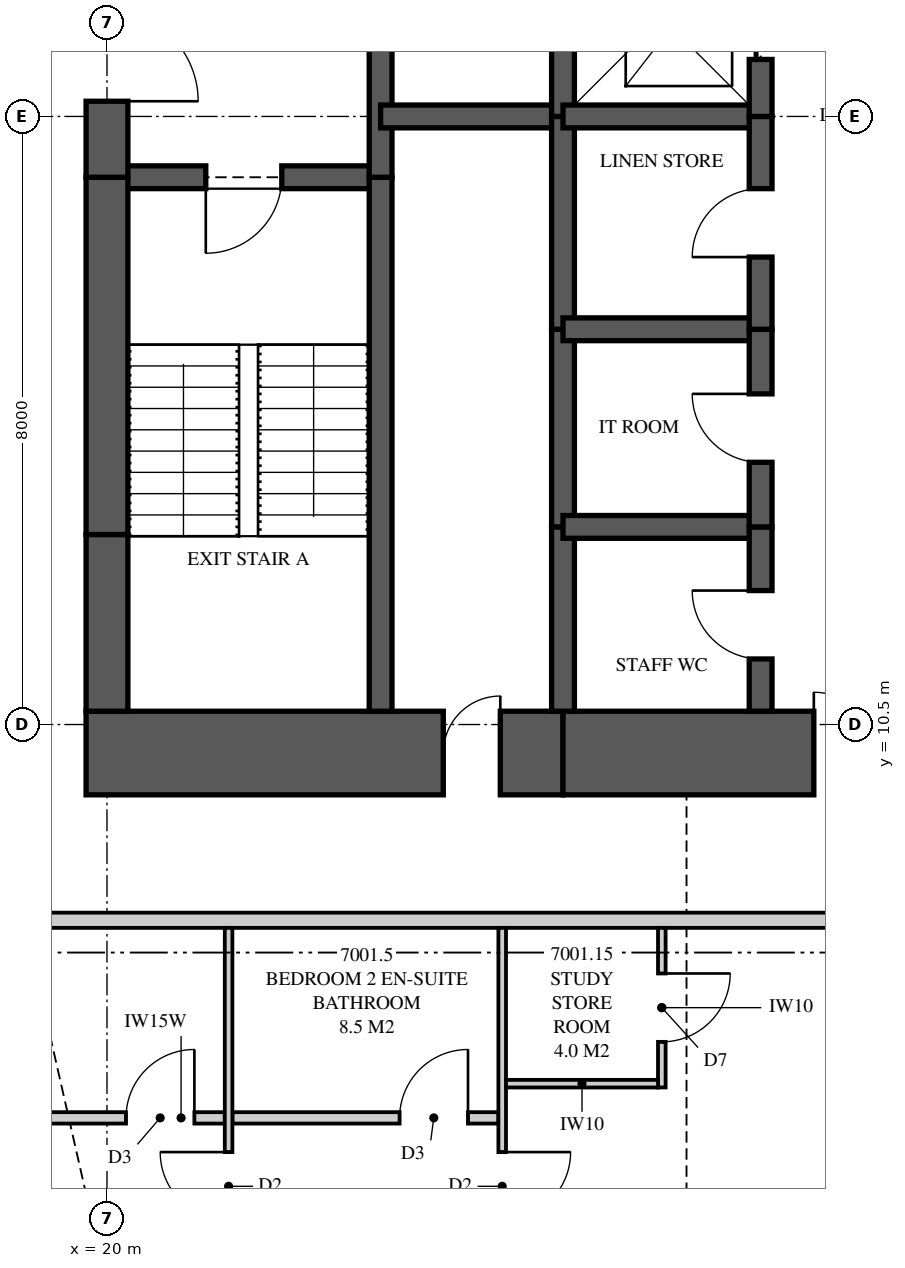
"""IFC4 building model, lengths in metres.
Left out: names, types, materials, properties, quantities, classifications, styles, units other than length and angle.
Written with IfcOpenShell. Run it as: python <this file> out.ifc"""

import sys

from ifc_helpers import new_model, si_unit, direction, frame, frame_2d, origin, place, context, subcontext, project, spatial, polyline, rectangle, outline, extrude, element, fill, save


model = new_model("IFC4")
c1 = context("Model", 3, precision=1e-05, world=origin(), true_north=direction((0.0, 1.0)))
c2 = subcontext(c1, "Body", "Model", "MODEL_VIEW")
j1 = project(units=[si_unit("LENGTHUNIT", "METRE"), si_unit("PLANEANGLEUNIT", "RADIAN")], contexts=[c1])
p1 = place(None, origin())
s1 = spatial("IfcSite", under=j1, at=p1, CompositionType="ELEMENT")
p2 = place(p1, origin())
s2 = spatial("IfcBuilding", under=s1, at=p2, CompositionType="ELEMENT")
p3 = place(p2, frame((0.0, 0.0, 256.45)))
s3 = spatial("IfcBuildingStorey", under=s2, at=p3, CompositionType="ELEMENT", Elevation=256.45)
p4 = place(p3, frame((19.725, 10.125, 0.0), z_axis=(0.0, 0.0, 1.0), x_axis=(1.0, 0.0, 0.0)))
e1 = element("IfcWall", 1, at=p4, inside=s3, PredefinedType="SHEAR", context=c2, shape_type="SweptSolid", body=[
    extrude(rectangle(XDim=6.275, YDim=1.1, at=frame_2d((3.137, 0.0))), origin(), (0.0, 0.0, 1.0), 3.5),
])
p5 = place(p4, frame((4.7, 0.0, 0.0)))
e2 = element("IfcOpeningElement", 2, at=p5, cuts=e1, PredefinedType="OPENING", context=c2, shape_type="SweptSolid", body=[
    extrude(rectangle(XDim=0.75, YDim=2.1, at=frame_2d((0.375, 1.05))), frame((0.0, 0.56, 0.0), z_axis=(0.0, -1.0, 0.0), x_axis=(1.0, 0.0, 0.0)), (0.0, 0.0, 1.0), 1.12),
])
p6 = place(p3, frame((26.0, 10.125, 0.0), z_axis=(0.0, 0.0, 1.0), x_axis=(1.0, 0.0, 0.0)))
e3 = element("IfcWall", 3, at=p6, inside=s3, PredefinedType="SHEAR", context=c2, shape_type="SweptSolid", body=[
    extrude(rectangle(XDim=5.6, YDim=1.1, at=frame_2d((2.8, 0.0))), origin(), (0.0, 0.0, 1.0), 3.5),
])
p7 = place(p6, frame((3.3, 0.0, 0.0)))
e4 = element("IfcOpeningElement", 4, at=p7, cuts=e3, PredefinedType="OPENING", context=c2, shape_type="SweptSolid", body=[
    extrude(rectangle(XDim=1.6, YDim=2.1, at=frame_2d((0.8, 1.05))), frame((0.0, 0.56, 0.0), z_axis=(0.0, -1.0, 0.0), x_axis=(1.0, 0.0, 0.0)), (0.0, 0.0, 1.0), 1.12),
])
p8 = place(p3, frame((20.0, 23.3, 0.0), z_axis=(0.0, 0.0, 1.0), x_axis=(0.0, -1.0, 0.0)))
e5 = element("IfcWall", 5, at=p8, inside=s3, PredefinedType="SHEAR", context=c2, shape_type="SweptSolid", body=[
    extrude(rectangle(XDim=5.6, YDim=0.55, at=frame_2d((2.8, 0.0))), origin(), (0.0, 0.0, 1.0), 3.5),
])
p9 = place(p8, frame((3.4, 0.0, 0.0)))
e6 = element("IfcOpeningElement", 6, at=p9, cuts=e5, PredefinedType="OPENING", context=c2, shape_type="SweptSolid", body=[
    extrude(rectangle(XDim=1.2, YDim=2.2, at=frame_2d((0.6, 1.1))), frame((0.0, 0.285, 0.0), z_axis=(0.0, -1.0, 0.0), x_axis=(1.0, 0.0, 0.0)), (0.0, 0.0, 1.0), 0.57),
])
p10 = place(p3, frame((20.0, 17.7, 0.0), z_axis=(0.0, 0.0, 1.0), x_axis=(0.0, -1.0, 0.0)))
e7 = element("IfcWall", 7, at=p10, inside=s3, PredefinedType="SHEAR", context=c2, shape_type="SweptSolid", body=[
    extrude(rectangle(XDim=4.7, YDim=0.55, at=frame_2d((2.35, 0.0))), origin(), (0.0, 0.0, 1.0), 3.5),
])
p11 = place(p3, frame((20.0, 13.0, 0.0), z_axis=(0.0, 0.0, 1.0), x_axis=(0.0, -1.0, 0.0)))
e8 = element("IfcWall", 8, at=p11, inside=s3, PredefinedType="SHEAR", context=c2, shape_type="SweptSolid", body=[
    extrude(rectangle(XDim=2.325, YDim=0.55, at=frame_2d((1.163, 0.0))), origin(), (0.0, 0.0, 1.0), 3.5),
])
p12 = place(p3, frame((23.6, 10.675, 0.0), z_axis=(0.0, 0.0, 1.0), x_axis=(0.0, 1.0, 0.0)))
e9 = element("IfcWall", 9, at=p12, inside=s3, PredefinedType="SHEAR", context=c2, shape_type="SweptSolid", body=[
    extrude(rectangle(XDim=7.025, YDim=0.3, at=frame_2d((3.512, 0.0))), origin(), (0.0, 0.0, 1.0), 3.5),
])
p13 = place(p3, frame((23.6, 17.7, 0.0), z_axis=(0.0, 0.0, 1.0), x_axis=(0.0, 1.0, 0.0)))
e10 = element("IfcWall", 10, at=p13, inside=s3, PredefinedType="SHEAR", context=c2, shape_type="SweptSolid", body=[
    extrude(rectangle(XDim=5.6, YDim=0.3, at=frame_2d((2.8, 0.0))), origin(), (0.0, 0.0, 1.0), 3.5),
])
p14 = place(p3, frame((26.0, 10.675, 0.0), z_axis=(0.0, 0.0, 1.0), x_axis=(0.0, 1.0, 0.0)))
e11 = element("IfcWall", 11, at=p14, inside=s3, PredefinedType="SHEAR", context=c2, shape_type="SweptSolid", body=[
    extrude(rectangle(XDim=2.425, YDim=0.3, at=frame_2d((1.212, 0.0))), origin(), (0.0, 0.0, 1.0), 3.5),
])
p15 = place(p3, frame((26.0, 13.1, 0.0), z_axis=(0.0, 0.0, 1.0), x_axis=(0.0, 1.0, 0.0)))
e12 = element("IfcWall", 12, at=p15, inside=s3, PredefinedType="SHEAR", context=c2, shape_type="SweptSolid", body=[
    extrude(rectangle(XDim=2.6, YDim=0.3, at=frame_2d((1.3, 0.0))), origin(), (0.0, 0.0, 1.0), 3.5),
])
p16 = place(p3, frame((26.0, 15.7, 0.0), z_axis=(0.0, 0.0, 1.0), x_axis=(0.0, 1.0, 0.0)))
e13 = element("IfcWall", 13, at=p16, inside=s3, PredefinedType="SHEAR", context=c2, shape_type="SweptSolid", body=[
    extrude(rectangle(XDim=2.8, YDim=0.3, at=frame_2d((1.4, 0.0))), origin(), (0.0, 0.0, 1.0), 3.5),
])
p17 = place(p3, frame((26.0, 18.5, 0.0), z_axis=(0.0, 0.0, 1.0), x_axis=(0.0, 1.0, 0.0)))
e14 = element("IfcWall", 14, at=p17, inside=s3, PredefinedType="SHEAR", context=c2, shape_type="SweptSolid", body=[
    extrude(rectangle(XDim=2.6, YDim=0.3, at=frame_2d((1.3, 0.0))), origin(), (0.0, 0.0, 1.0), 3.5),
])
p18 = place(p3, frame((28.6, 10.675, 0.0), z_axis=(0.0, 0.0, 1.0), x_axis=(0.0, 1.0, 0.0)))
e15 = element("IfcWall", 15, at=p18, inside=s3, PredefinedType="SHEAR", context=c2, shape_type="SweptSolid", body=[
    extrude(rectangle(XDim=2.425, YDim=0.3, at=frame_2d((1.212, 0.0))), origin(), (0.0, 0.0, 1.0), 3.5),
])
p19 = place(p18, frame((0.688, 0.0, 0.0)))
e16 = element("IfcOpeningElement", 16, at=p19, cuts=e15, PredefinedType="OPENING", context=c2, shape_type="SweptSolid", body=[
    extrude(rectangle(XDim=0.9, YDim=2.1, at=frame_2d((0.45, 1.05))), frame((0.0, 0.16, 0.0), z_axis=(0.0, -1.0, 0.0), x_axis=(1.0, 0.0, 0.0)), (0.0, 0.0, 1.0), 0.32),
])
p20 = place(p3, frame((28.6, 13.1, 0.0), z_axis=(0.0, 0.0, 1.0), x_axis=(0.0, 1.0, 0.0)))
e17 = element("IfcWall", 17, at=p20, inside=s3, PredefinedType="SHEAR", context=c2, shape_type="SweptSolid", body=[
    extrude(rectangle(XDim=2.6, YDim=0.3, at=frame_2d((1.3, 0.0))), origin(), (0.0, 0.0, 1.0), 3.5),
])
p21 = place(p20, frame((0.85, 0.0, 0.0)))
e18 = element("IfcOpeningElement", 18, at=p21, cuts=e17, PredefinedType="OPENING", context=c2, shape_type="SweptSolid", body=[
    extrude(rectangle(XDim=0.9, YDim=2.1, at=frame_2d((0.45, 1.05))), frame((0.0, 0.16, 0.0), z_axis=(0.0, -1.0, 0.0), x_axis=(1.0, 0.0, 0.0)), (0.0, 0.0, 1.0), 0.32),
])
p22 = place(p3, frame((28.6, 15.7, 0.0), z_axis=(0.0, 0.0, 1.0), x_axis=(0.0, 1.0, 0.0)))
e19 = element("IfcWall", 19, at=p22, inside=s3, PredefinedType="SHEAR", context=c2, shape_type="SweptSolid", body=[
    extrude(rectangle(XDim=2.8, YDim=0.3, at=frame_2d((1.4, 0.0))), origin(), (0.0, 0.0, 1.0), 3.5),
])
p23 = place(p22, frame((0.95, 0.0, 0.0)))
e20 = element("IfcOpeningElement", 20, at=p23, cuts=e19, PredefinedType="OPENING", context=c2, shape_type="SweptSolid", body=[
    extrude(rectangle(XDim=0.9, YDim=2.1, at=frame_2d((0.45, 1.05))), frame((0.0, 0.16, 0.0), z_axis=(0.0, -1.0, 0.0), x_axis=(1.0, 0.0, 0.0)), (0.0, 0.0, 1.0), 0.32),
])
p24 = place(p3, frame((28.6, 18.5, 0.0), z_axis=(0.0, 0.0, 1.0), x_axis=(0.0, 1.0, 0.0)))
e21 = element("IfcWall", 21, at=p24, inside=s3, PredefinedType="SHEAR", context=c2, shape_type="SweptSolid", body=[
    extrude(rectangle(XDim=2.6, YDim=0.3, at=frame_2d((1.3, 0.0))), origin(), (0.0, 0.0, 1.0), 3.5),
])
p25 = place(p24, frame((0.75, 0.0, 0.0)))
e22 = element("IfcOpeningElement", 22, at=p25, cuts=e21, PredefinedType="OPENING", context=c2, shape_type="SweptSolid", body=[
    extrude(rectangle(XDim=1.1, YDim=2.1, at=frame_2d((0.55, 1.05))), frame((0.0, 0.16, 0.0), z_axis=(0.0, -1.0, 0.0), x_axis=(1.0, 0.0, 0.0)), (0.0, 0.0, 1.0), 0.32),
])
p26 = place(p3, frame((20.0, 17.7, 0.0), z_axis=(0.0, 0.0, 1.0), x_axis=(1.0, 0.0, 0.0)))
e23 = element("IfcWall", 23, at=p26, inside=s3, PredefinedType="SHEAR", context=c2, shape_type="SweptSolid", body=[
    extrude(rectangle(XDim=3.6, YDim=0.3, at=frame_2d((1.8, 0.0))), origin(), (0.0, 0.0, 1.0), 3.5),
])
p27 = place(p26, frame((1.3, 0.0, 0.0)))
e24 = element("IfcOpeningElement", 24, at=p27, cuts=e23, PredefinedType="OPENING", context=c2, shape_type="SweptSolid", body=[
    extrude(rectangle(XDim=1.0, YDim=2.1, at=frame_2d((0.5, 1.05))), frame((0.0, 0.16, 0.0), z_axis=(0.0, -1.0, 0.0), x_axis=(1.0, 0.0, 0.0)), (0.0, 0.0, 1.0), 0.32),
])
p28 = place(p3, frame((23.6, 18.5, 0.0), z_axis=(0.0, 0.0, 1.0), x_axis=(1.0, 0.0, 0.0)))
e25 = element("IfcWall", 25, at=p28, inside=s3, PredefinedType="SHEAR", context=c2, shape_type="SweptSolid", body=[
    extrude(rectangle(XDim=2.4, YDim=0.3, at=frame_2d((1.2, 0.0))), origin(), (0.0, 0.0, 1.0), 3.5),
])
for number, where, z_axis, x_axis in (
    (26, (26.0, 13.1, 0.0), (0.0, 0.0, 1.0), (1.0, 0.0, 0.0)),
    (27, (26.0, 15.7, 0.0), (0.0, 0.0, 1.0), (1.0, 0.0, 0.0)),
    (28, (26.0, 18.5, 0.0), (0.0, 0.0, 1.0), (1.0, 0.0, 0.0)),
):
    element("IfcWall", number, at=place(p3, frame(where, z_axis=z_axis, x_axis=x_axis)), inside=s3, PredefinedType="SHEAR", context=c2, shape_type="SweptSolid", body=[
        extrude(rectangle(XDim=2.6, YDim=0.3, at=frame_2d((1.3, 0.0))), origin(), (0.0, 0.0, 1.0), 3.5),
    ])
p29 = place(p3, frame((18.0, 7.925, 0.0), z_axis=(0.0, 0.0, 1.0), x_axis=(1.0, 0.0, 0.0)))
e29 = element("IfcWall", 29, at=p29, inside=s3, PredefinedType="PARTITIONING", context=c2, shape_type="SweptSolid", body=[
    extrude(outline(polyline([(0.0, 0.0), (38.325, 0.0), (38.325, 3.26), (37.875, 3.26), (37.875, 2.3), (36.043, 2.3), (36.043, 3.26), (30.185, 3.26), (30.185, 2.66), (27.565, 2.66), (27.565, 3.26), (20.56, 3.26), (20.56, 2.66), (17.94, 2.66), (17.94, 3.26), (10.935, 3.26), (10.935, 2.66), (8.315, 2.66), (8.315, 3.26), (1.839, 3.26), (1.839, 2.3), (0.0, 2.3), (0.0, 3.26), (0.0, 0.0)])), frame((0.0, 0.1, 0.0), z_axis=(0.0, -1.0, 0.0), x_axis=(1.0, 0.0, 0.0)), (0.0, 0.0, 1.0), 0.2),
])
p30 = place(p29, frame((18.75, 0.0, 0.0)))
e30 = element("IfcOpeningElement", 30, at=p30, cuts=e29, PredefinedType="OPENING", context=c2, shape_type="SweptSolid", body=[
    extrude(rectangle(XDim=1.05, YDim=2.2, at=frame_2d((0.525, 1.1))), frame((0.0, 0.11, 0.0), z_axis=(0.0, -1.0, 0.0), x_axis=(1.0, 0.0, 0.0)), (0.0, 0.0, 1.0), 0.22),
])
p31 = place(p3, frame((21.6, 0.175, 0.0), z_axis=(0.0, 0.0, 1.0), x_axis=(0.0, 1.0, 0.0)))
e31 = element("IfcWall", 31, at=p31, inside=s3, PredefinedType="PARTITIONING", context=c2, shape_type="SweptSolid", body=[
    extrude(outline(polyline([(0.0, 0.0), (7.65, 0.0), (7.65, 3.26), (2.668, 3.26), (2.668, 2.3), (0.924, 2.3), (0.924, 3.26), (0.0, 3.26), (0.0, 0.0)])), frame((0.0, 0.05, 0.0), z_axis=(0.0, -1.0, 0.0), x_axis=(1.0, 0.0, 0.0)), (0.0, 0.0, 1.0), 0.1),
])
p32 = place(p31, frame((3.8, 0.0, 0.0)))
e32 = element("IfcOpeningElement", 32, at=p32, cuts=e31, PredefinedType="OPENING", context=c2, shape_type="SweptSolid", body=[
    extrude(rectangle(XDim=0.9, YDim=2.1, at=frame_2d((0.45, 1.05))), frame((0.0, 0.06, 0.0), z_axis=(0.0, -1.0, 0.0), x_axis=(1.0, 0.0, 0.0)), (0.0, 0.0, 1.0), 0.12),
])
p33 = place(p3, frame((25.2, 0.175, 0.0), z_axis=(0.0, 0.0, 1.0), x_axis=(0.0, 1.0, 0.0)))
e33 = element("IfcWall", 33, at=p33, inside=s3, PredefinedType="PARTITIONING", context=c2, shape_type="SweptSolid", body=[
    extrude(outline(polyline([(0.0, 0.0), (7.65, 0.0), (7.65, 3.26), (2.058, 3.26), (2.058, 2.3), (0.314, 2.3), (0.314, 3.26), (0.0, 3.26), (0.0, 0.0)])), frame((0.0, 0.05, 0.0), z_axis=(0.0, -1.0, 0.0), x_axis=(1.0, 0.0, 0.0)), (0.0, 0.0, 1.0), 0.1),
])
p34 = place(p33, frame((3.8, 0.0, 0.0)))
e34 = element("IfcOpeningElement", 34, at=p34, cuts=e33, PredefinedType="OPENING", context=c2, shape_type="SweptSolid", body=[
    extrude(rectangle(XDim=0.9, YDim=2.1, at=frame_2d((0.45, 1.05))), frame((0.0, 0.06, 0.0), z_axis=(0.0, -1.0, 0.0), x_axis=(1.0, 0.0, 0.0)), (0.0, 0.0, 1.0), 0.12),
])
p35 = place(p3, frame((16.8, 5.325, 0.0), z_axis=(0.0, 0.0, 1.0), x_axis=(1.0, 0.0, 0.0)))
e35 = element("IfcWall", 35, at=p35, inside=s3, PredefinedType="PLUMBINGWALL", context=c2, shape_type="SweptSolid", body=[
    extrude(outline(polyline([(0.0, 0.0), (4.75, 0.0), (4.75, 3.26), (3.605, 3.26), (3.605, 2.3), (1.79, 2.3), (1.79, 3.26), (0.0, 3.26), (0.0, 0.0)])), frame((0.0, 0.075, 0.0), z_axis=(0.0, -1.0, 0.0), x_axis=(1.0, 0.0, 0.0)), (0.0, 0.0, 1.0), 0.15),
])
p36 = place(p35, frame((3.45, 0.0, 0.0)))
e36 = element("IfcOpeningElement", 36, at=p36, cuts=e35, PredefinedType="OPENING", context=c2, shape_type="SweptSolid", body=[
    extrude(rectangle(XDim=0.9, YDim=2.1, at=frame_2d((0.45, 1.05))), frame((0.0, 0.085, 0.0), z_axis=(0.0, -1.0, 0.0), x_axis=(1.0, 0.0, 0.0)), (0.0, 0.0, 1.0), 0.17),
])
p37 = place(p3, frame((21.65, 5.325, 0.0), z_axis=(0.0, 0.0, 1.0), x_axis=(1.0, 0.0, 0.0)))
e37 = element("IfcWall", 37, at=p37, inside=s3, PredefinedType="PLUMBINGWALL", context=c2, shape_type="SweptSolid", body=[
    extrude(rectangle(XDim=3.5, YDim=0.15, at=frame_2d((1.75, 0.0))), origin(), (0.0, 0.0, 1.0), 3.26),
])
p38 = place(p37, frame((2.2, 0.0, 0.0)))
e38 = element("IfcOpeningElement", 38, at=p38, cuts=e37, PredefinedType="OPENING", context=c2, shape_type="SweptSolid", body=[
    extrude(rectangle(XDim=0.9, YDim=2.1, at=frame_2d((0.45, 1.05))), frame((0.0, 0.085, 0.0), z_axis=(0.0, -1.0, 0.0), x_axis=(1.0, 0.0, 0.0)), (0.0, 0.0, 1.0), 0.17),
])
p39 = place(p3, frame((27.3, 7.825, 0.0), z_axis=(0.0, 0.0, 1.0), x_axis=(0.0, -1.0, 0.0)))
e39 = element("IfcWall", 39, at=p39, inside=s3, PredefinedType="PARTITIONING", context=c2, shape_type="SweptSolid", body=[
    extrude(outline(polyline([(0.0, 0.0), (2.1, 0.0), (2.1, 3.26), (2.1, 2.66), (0.0, 2.66), (0.0, 3.26), (0.0, 0.0)])), frame((0.0, 0.05, 0.0), z_axis=(0.0, -1.0, 0.0), x_axis=(1.0, 0.0, 0.0)), (0.0, 0.0, 1.0), 0.1),
])
p40 = place(p39, frame((0.6, 0.0, 0.0)))
e40 = element("IfcOpeningElement", 40, at=p40, cuts=e39, PredefinedType="OPENING", context=c2, shape_type="SweptSolid", body=[
    extrude(rectangle(XDim=0.9, YDim=2.1, at=frame_2d((0.45, 1.05))), frame((0.0, 0.06, 0.0), z_axis=(0.0, -1.0, 0.0), x_axis=(1.0, 0.0, 0.0)), (0.0, 0.0, 1.0), 0.12),
])
p41 = place(p3, frame((25.25, 5.775, 0.0), z_axis=(0.0, 0.0, 1.0), x_axis=(1.0, 0.0, 0.0)))
e41 = element("IfcWall", 41, at=p41, inside=s3, PredefinedType="PARTITIONING", context=c2, shape_type="SweptSolid", body=[
    extrude(outline(polyline([(0.0, 0.0), (2.0, 0.0), (2.0, 3.26), (2.0, 2.66), (1.115, 2.66), (1.115, 3.26), (0.0, 3.26), (0.0, 0.0)])), frame((0.0, 0.05, 0.0), z_axis=(0.0, -1.0, 0.0), x_axis=(1.0, 0.0, 0.0)), (0.0, 0.0, 1.0), 0.1),
])
p42 = place(p32, origin())
e42 = element("IfcDoor", 42, at=p42, inside=s3, OperationType="SINGLE_SWING_RIGHT", PredefinedType="DOOR", context=c2, shape_type="SweptSolid", body=[
    extrude(rectangle(XDim=0.9, YDim=2.1, at=frame_2d((0.45, 1.05))), frame((0.0, 0.025, 0.0), z_axis=(0.0, -1.0, 0.0), x_axis=(1.0, 0.0, 0.0)), (0.0, 0.0, 1.0), 0.05),
])
fill(e32, e42)
p43 = place(p36, origin())
e43 = element("IfcDoor", 43, at=p43, inside=s3, OperationType="SINGLE_SWING_RIGHT", PredefinedType="DOOR", context=c2, shape_type="SweptSolid", body=[
    extrude(rectangle(XDim=0.9, YDim=2.1, at=frame_2d((0.45, 1.05))), frame((0.0, 0.025, 0.0), z_axis=(0.0, -1.0, 0.0), x_axis=(1.0, 0.0, 0.0)), (0.0, 0.0, 1.0), 0.05),
])
fill(e36, e43)
p44 = place(p34, frame((0.9, 0.0, 0.0), z_axis=(0.0, 0.0, 1.0), x_axis=(-1.0, 0.0, 0.0)))
e44 = element("IfcDoor", 44, at=p44, inside=s3, OperationType="SINGLE_SWING_LEFT", PredefinedType="DOOR", context=c2, shape_type="SweptSolid", body=[
    extrude(rectangle(XDim=0.9, YDim=2.1, at=frame_2d((0.45, 1.05))), frame((0.0, 0.025, 0.0), z_axis=(0.0, -1.0, 0.0), x_axis=(1.0, 0.0, 0.0)), (0.0, 0.0, 1.0), 0.05),
])
fill(e34, e44)
p45 = place(p38, origin())
e45 = element("IfcDoor", 45, at=p45, inside=s3, OperationType="SINGLE_SWING_RIGHT", PredefinedType="DOOR", context=c2, shape_type="SweptSolid", body=[
    extrude(rectangle(XDim=0.9, YDim=2.1, at=frame_2d((0.45, 1.05))), frame((0.0, 0.025, 0.0), z_axis=(0.0, -1.0, 0.0), x_axis=(1.0, 0.0, 0.0)), (0.0, 0.0, 1.0), 0.05),
])
fill(e38, e45)
p46 = place(p40, origin())
e46 = element("IfcDoor", 46, at=p46, inside=s3, OperationType="SINGLE_SWING_LEFT", PredefinedType="DOOR", context=c2, shape_type="SweptSolid", body=[
    extrude(rectangle(XDim=0.9, YDim=2.1, at=frame_2d((0.45, 1.05))), frame((0.0, 0.025, 0.0), z_axis=(0.0, -1.0, 0.0), x_axis=(1.0, 0.0, 0.0)), (0.0, 0.0, 1.0), 0.05),
])
fill(e40, e46)
p47 = place(p27, frame((1.0, 0.0, 0.0), z_axis=(0.0, 0.0, 1.0), x_axis=(-1.0, 0.0, 0.0)))
e47 = element("IfcDoor", 47, at=p47, inside=s3, OperationType="SINGLE_SWING_RIGHT", PredefinedType="DOOR", context=c2, shape_type="SweptSolid", body=[
    extrude(rectangle(XDim=1.0, YDim=2.1, at=frame_2d((0.5, 1.05))), frame((0.0, 0.025, 0.0), z_axis=(0.0, -1.0, 0.0), x_axis=(1.0, 0.0, 0.0)), (0.0, 0.0, 1.0), 0.05),
])
fill(e24, e47)
p48 = place(p9, origin())
e48 = element("IfcDoor", 48, at=p48, inside=s3, OperationType="SINGLE_SWING_RIGHT", PredefinedType="DOOR", context=c2, shape_type="SweptSolid", body=[
    extrude(rectangle(XDim=1.2, YDim=2.2, at=frame_2d((0.6, 1.1))), frame((0.0, 0.025, 0.0), z_axis=(0.0, -1.0, 0.0), x_axis=(1.0, 0.0, 0.0)), (0.0, 0.0, 1.0), 0.05),
])
fill(e6, e48)
p49 = place(p25, origin())
e49 = element("IfcDoor", 49, at=p49, inside=s3, OperationType="SLIDING_TO_LEFT", PredefinedType="DOOR", context=c2, shape_type="SweptSolid", body=[
    extrude(rectangle(XDim=1.1, YDim=2.1, at=frame_2d((0.55, 1.05))), frame((0.0, 0.025, 0.0), z_axis=(0.0, -1.0, 0.0), x_axis=(1.0, 0.0, 0.0)), (0.0, 0.0, 1.0), 0.05),
])
fill(e22, e49)
p50 = place(p19, origin())
e50 = element("IfcDoor", 50, at=p50, inside=s3, OperationType="SINGLE_SWING_RIGHT", PredefinedType="DOOR", context=c2, shape_type="SweptSolid", body=[
    extrude(rectangle(XDim=0.9, YDim=2.1, at=frame_2d((0.45, 1.05))), frame((0.0, 0.025, 0.0), z_axis=(0.0, -1.0, 0.0), x_axis=(1.0, 0.0, 0.0)), (0.0, 0.0, 1.0), 0.05),
])
fill(e16, e50)
p51 = place(p21, origin())
e51 = element("IfcDoor", 51, at=p51, inside=s3, OperationType="SINGLE_SWING_RIGHT", PredefinedType="DOOR", context=c2, shape_type="SweptSolid", body=[
    extrude(rectangle(XDim=0.9, YDim=2.1, at=frame_2d((0.45, 1.05))), frame((0.0, 0.025, 0.0), z_axis=(0.0, -1.0, 0.0), x_axis=(1.0, 0.0, 0.0)), (0.0, 0.0, 1.0), 0.05),
])
fill(e18, e51)
p52 = place(p23, origin())
e52 = element("IfcDoor", 52, at=p52, inside=s3, OperationType="SINGLE_SWING_LEFT", PredefinedType="DOOR", context=c2, shape_type="SweptSolid", body=[
    extrude(rectangle(XDim=0.9, YDim=2.1, at=frame_2d((0.45, 1.05))), frame((0.0, 0.025, 0.0), z_axis=(0.0, -1.0, 0.0), x_axis=(1.0, 0.0, 0.0)), (0.0, 0.0, 1.0), 0.05),
])
fill(e20, e52)
p53 = place(p7, origin())
e53 = element("IfcDoor", 53, at=p53, inside=s3, OperationType="DOUBLE_DOOR_SINGLE_SWING", PredefinedType="DOOR", context=c2, shape_type="SweptSolid", body=[
    extrude(rectangle(XDim=1.6, YDim=2.1, at=frame_2d((0.8, 1.05))), frame((0.0, 0.025, 0.0), z_axis=(0.0, -1.0, 0.0), x_axis=(1.0, 0.0, 0.0)), (0.0, 0.0, 1.0), 0.05),
])
fill(e4, e53)
p54 = place(p5, origin())
e54 = element("IfcDoor", 54, at=p54, inside=s3, OperationType="SINGLE_SWING_RIGHT", PredefinedType="DOOR", context=c2, shape_type="SweptSolid", body=[
    extrude(rectangle(XDim=0.75, YDim=2.1, at=frame_2d((0.375, 1.05))), frame((0.0, 0.025, 0.0), z_axis=(0.0, -1.0, 0.0), x_axis=(1.0, 0.0, 0.0)), (0.0, 0.0, 1.0), 0.05),
])
fill(e2, e54)
save(model, sys.argv[1])
